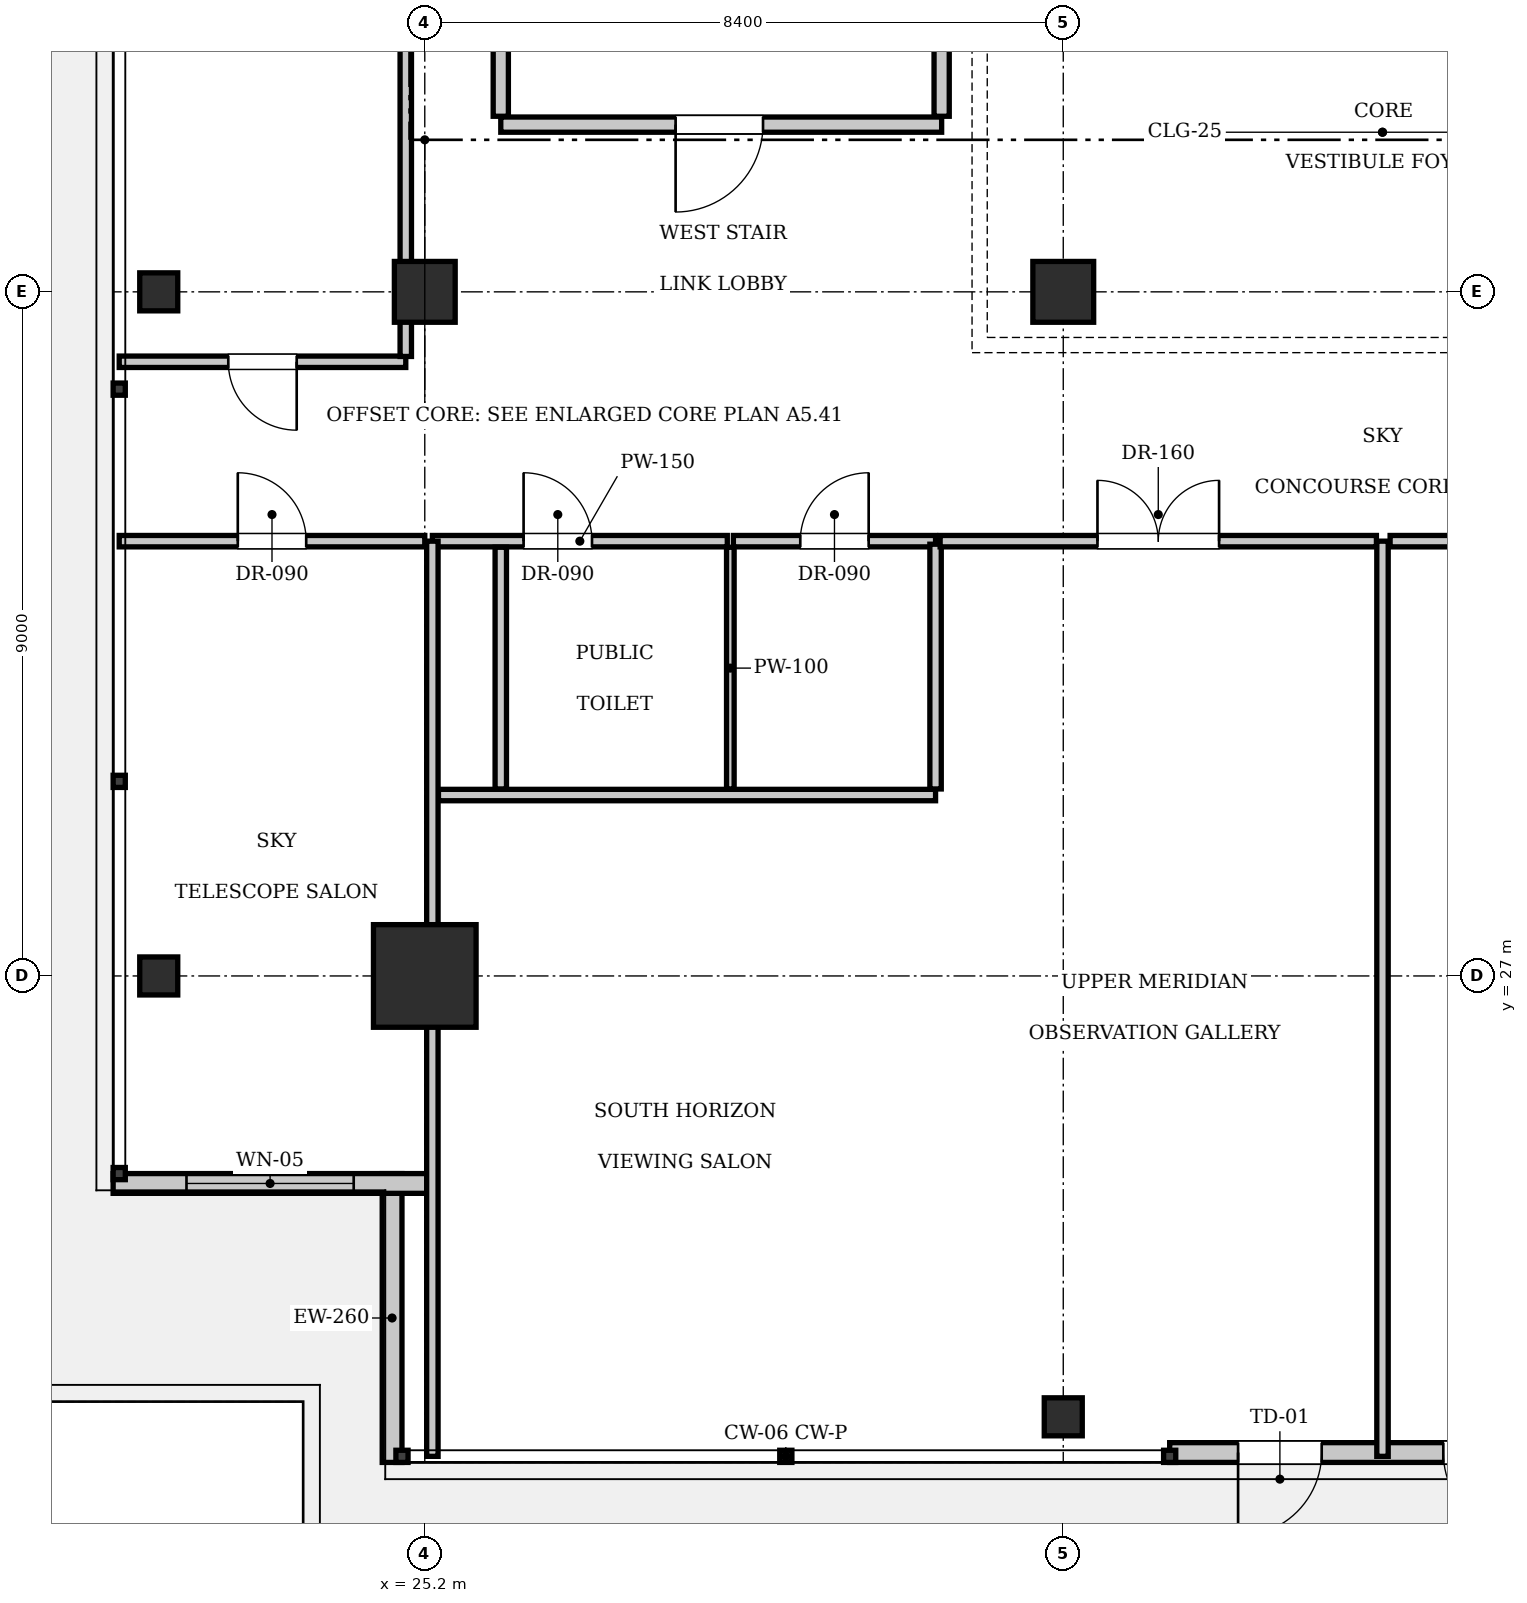
"""IFC4 building model, lengths in metres.
Left out: names, types, materials, properties, quantities, classifications, styles, units other than length and angle.
Written with IfcOpenShell. Run it as: python <this file> out.ifc"""

import sys

from ifc_helpers import new_model, si_unit, direction, frame, frame_2d, origin, origin_2d, place, context, subcontext, project, spatial, rectangle, i_section, extrude, element, fill, save


model = new_model("IFC4")
c1 = context("Model", 3, precision=1e-05, world=origin(), true_north=direction((0.0, 1.0)))
c2 = subcontext(c1, "Body", "Model", "MODEL_VIEW")
j1 = project(units=[si_unit("LENGTHUNIT", "METRE"), si_unit("PLANEANGLEUNIT", "RADIAN")], contexts=[c1])
p1 = place(None, origin())
s1 = spatial("IfcSite", under=j1, at=p1, CompositionType="ELEMENT")
p2 = place(p1, origin())
s2 = spatial("IfcBuilding", under=s1, at=p2, CompositionType="ELEMENT")
p3 = place(p2, frame((0.0, 0.0, 359.1)))
s3 = spatial("IfcBuildingStorey", under=s2, at=p3, CompositionType="ELEMENT", Elevation=359.1)
p4 = place(p3, frame((25.2, 27.0, 0.0), z_axis=(0.0, 0.0, 1.0), x_axis=(1.0, 0.0, 0.0)))
e1 = element("IfcColumn", 1, at=p4, inside=s3, PredefinedType="COLUMN", context=c2, shape_type="SweptSolid", body=[
    extrude(rectangle(XDim=1.35, YDim=1.35, at=origin_2d()), origin(), (0.0, 0.0, 1.0), 5.25),
])
for number, where, z_axis, x_axis in (
    (2, (25.2, 36.0, 0.0), (0.0, 0.0, 1.0), (1.0, 0.0, 0.0)),
    (3, (33.6, 36.0, 0.0), (0.0, 0.0, 1.0), (1.0, 0.0, 0.0)),
):
    element("IfcColumn", number, at=place(p3, frame(where, z_axis=z_axis, x_axis=x_axis)), inside=s3, PredefinedType="COLUMN", context=c2, shape_type="SweptSolid", body=[
        extrude(rectangle(XDim=0.8, YDim=0.8, at=origin_2d()), origin(), (0.0, 0.0, 1.0), 5.25),
    ])
for number, where, z_axis, x_axis in (
    (4, (21.7, 27.0, -0.26), (0.0, 0.0, 1.0), (1.0, 0.0, 0.0)),
    (5, (21.7, 36.0, -0.26), (0.0, 0.0, 1.0), (1.0, 0.0, 0.0)),
    (6, (33.6, 21.2, -0.26), (0.0, 0.0, 1.0), (1.0, 0.0, 0.0)),
):
    element("IfcColumn", number, at=place(p3, frame(where, z_axis=z_axis, x_axis=x_axis)), inside=s3, PredefinedType="COLUMN", context=c2, shape_type="SweptSolid", body=[
        extrude(i_section(OverallWidth=0.5, OverallDepth=0.5, WebThickness=0.022, FlangeThickness=0.032, at=origin_2d()), origin(), (0.0, 0.0, 1.0), 5.51),
    ])
p5 = place(p3, frame((24.77, 20.6, 0.0), z_axis=(0.0, 0.0, 1.0), x_axis=(0.0, 1.0, 0.0)))
e7 = element("IfcWall", 7, at=p5, inside=s3, PredefinedType="SOLIDWALL", context=c2, shape_type="SweptSolid", body=[
    extrude(rectangle(XDim=3.8, YDim=0.26, at=frame_2d((1.9, 0.0))), origin(), (0.0, 0.0, 1.0), 4.97),
])
p6 = place(p3, frame((25.23, 24.27, 0.0), z_axis=(0.0, 0.0, 1.0), x_axis=(-1.0, 0.0, 0.0)))
e8 = element("IfcWall", 8, at=p6, inside=s3, PredefinedType="SOLIDWALL", context=c2, shape_type="SweptSolid", body=[
    extrude(rectangle(XDim=4.13, YDim=0.26, at=frame_2d((2.065, 0.0))), origin(), (0.0, 0.0, 1.0), 4.97),
])
p7 = place(p6, frame((0.965, 0.0, 0.9)))
e9 = element("IfcOpeningElement", 9, at=p7, cuts=e8, PredefinedType="OPENING", context=c2, shape_type="SweptSolid", body=[
    extrude(rectangle(XDim=2.2, YDim=2.8, at=frame_2d((1.1, 1.4))), frame((0.0, 0.14, 0.0), z_axis=(0.0, -1.0, 0.0), x_axis=(1.0, 0.0, 0.0)), (0.0, 0.0, 1.0), 0.28),
])
p8 = place(p3, frame((40.6, 20.73, 0.0), z_axis=(0.0, 0.0, 1.0), x_axis=(-1.0, 0.0, 0.0)))
e10 = element("IfcWall", 10, at=p8, inside=s3, PredefinedType="SOLIDWALL", context=c2, shape_type="SweptSolid", body=[
    extrude(rectangle(XDim=5.6, YDim=0.26, at=frame_2d((2.8, 0.0))), origin(), (0.0, 0.0, 1.0), 4.97),
])
p9 = place(p8, frame((0.9, 0.0, 0.0)))
e11 = element("IfcOpeningElement", 11, at=p9, cuts=e10, PredefinedType="OPENING", context=c2, shape_type="SweptSolid", body=[
    extrude(rectangle(XDim=1.1, YDim=2.2, at=frame_2d((0.55, 1.1))), frame((0.0, 0.14, 0.0), z_axis=(0.0, -1.0, 0.0), x_axis=(1.0, 0.0, 0.0)), (0.0, 0.0, 1.0), 0.28),
])
p10 = place(p8, frame((3.6, 0.0, 0.0)))
e12 = element("IfcOpeningElement", 12, at=p10, cuts=e10, PredefinedType="OPENING", context=c2, shape_type="SweptSolid", body=[
    extrude(rectangle(XDim=1.1, YDim=2.2, at=frame_2d((0.55, 1.1))), frame((0.0, 0.14, 0.0), z_axis=(0.0, -1.0, 0.0), x_axis=(1.0, 0.0, 0.0)), (0.0, 0.0, 1.0), 0.28),
])
p11 = place(p3, frame((26.2, 38.2, 0.0), z_axis=(0.0, 0.0, 1.0), x_axis=(1.0, 0.0, 0.0)))
e13 = element("IfcWall", 13, at=p11, inside=s3, PredefinedType="PARTITIONING", context=c2, shape_type="SweptSolid", body=[
    extrude(rectangle(XDim=5.8, YDim=0.2, at=frame_2d((2.9, 0.0))), origin(), (0.0, 0.0, 1.0), 4.97),
])
p12 = place(p11, frame((2.3, 0.0, 0.0)))
e14 = element("IfcOpeningElement", 14, at=p12, cuts=e13, PredefinedType="OPENING", context=c2, shape_type="SweptSolid", body=[
    extrude(rectangle(XDim=1.15, YDim=2.15, at=frame_2d((0.575, 1.075))), frame((0.0, 0.11, 0.0), z_axis=(0.0, -1.0, 0.0), x_axis=(1.0, 0.0, 0.0)), (0.0, 0.0, 1.0), 0.22),
])
for number, where, z_axis, x_axis in (
    (15, (26.2, 38.31, 0.0), (0.0, 0.0, 1.0), (0.0, 1.0, 0.0)),
    (16, (32.0, 38.31, 0.0), (0.0, 0.0, 1.0), (0.0, 1.0, 0.0)),
):
    element("IfcWall", number, at=place(p3, frame(where, z_axis=z_axis, x_axis=x_axis)), inside=s3, PredefinedType="PARTITIONING", context=c2, shape_type="SweptSolid", body=[
        extrude(rectangle(XDim=3.07, YDim=0.2, at=frame_2d((1.535, 0.0))), origin(), (0.0, 0.0, 1.0), 4.97),
    ])
p13 = place(p3, frame((25.3, 32.72, 0.0), z_axis=(0.0, 0.0, 1.0), x_axis=(1.0, 0.0, 0.0)))
e17 = element("IfcWall", 17, at=p13, inside=s3, PredefinedType="PARTITIONING", context=c2, shape_type="SweptSolid", body=[
    extrude(rectangle(XDim=3.88, YDim=0.15, at=frame_2d((1.94, 0.0))), origin(), (0.0, 0.0, 1.0), 4.97),
])
p14 = place(p13, frame((1.2, 0.0, 0.0)))
e18 = element("IfcOpeningElement", 18, at=p14, cuts=e17, PredefinedType="OPENING", context=c2, shape_type="SweptSolid", body=[
    extrude(rectangle(XDim=0.9, YDim=2.1, at=frame_2d((0.45, 1.05))), frame((0.0, 0.085, 0.0), z_axis=(0.0, -1.0, 0.0), x_axis=(1.0, 0.0, 0.0)), (0.0, 0.0, 1.0), 0.17),
])
p15 = place(p3, frame((29.26, 32.72, 0.0), z_axis=(0.0, 0.0, 1.0), x_axis=(1.0, 0.0, 0.0)))
e19 = element("IfcWall", 19, at=p15, inside=s3, PredefinedType="PARTITIONING", context=c2, shape_type="SweptSolid", body=[
    extrude(rectangle(XDim=2.66, YDim=0.15, at=frame_2d((1.33, 0.0))), origin(), (0.0, 0.0, 1.0), 4.97),
])
p16 = place(p15, frame((0.88, 0.0, 0.0)))
e20 = element("IfcOpeningElement", 20, at=p16, cuts=e19, PredefinedType="OPENING", context=c2, shape_type="SweptSolid", body=[
    extrude(rectangle(XDim=0.9, YDim=2.1, at=frame_2d((0.45, 1.05))), frame((0.0, 0.085, 0.0), z_axis=(0.0, -1.0, 0.0), x_axis=(1.0, 0.0, 0.0)), (0.0, 0.0, 1.0), 0.17),
])
p17 = place(p3, frame((25.38, 29.38, 0.0), z_axis=(0.0, 0.0, 1.0), x_axis=(1.0, 0.0, 0.0)))
e21 = element("IfcWall", 21, at=p17, inside=s3, PredefinedType="PARTITIONING", context=c2, shape_type="SweptSolid", body=[
    extrude(rectangle(XDim=6.54, YDim=0.15, at=frame_2d((3.27, 0.0))), origin(), (0.0, 0.0, 1.0), 4.97),
])
p18 = place(p3, frame((26.2, 29.46, 0.0), z_axis=(0.0, 0.0, 1.0), x_axis=(0.0, 1.0, 0.0)))
e22 = element("IfcWall", 22, at=p18, inside=s3, PredefinedType="PARTITIONING", context=c2, shape_type="SweptSolid", body=[
    extrude(rectangle(XDim=3.18, YDim=0.15, at=frame_2d((1.59, 0.0))), origin(), (0.0, 0.0, 1.0), 4.97),
])
p19 = place(p3, frame((29.22, 29.46, 0.0), z_axis=(0.0, 0.0, 1.0), x_axis=(0.0, 1.0, 0.0)))
e23 = element("IfcWall", 23, at=p19, inside=s3, PredefinedType="PARTITIONING", context=c2, shape_type="SweptSolid", body=[
    extrude(rectangle(XDim=3.18, YDim=0.1, at=frame_2d((1.59, 0.0))), origin(), (0.0, 0.0, 1.0), 4.97),
])
p20 = place(p3, frame((31.92, 29.46, 0.0), z_axis=(0.0, 0.0, 1.0), x_axis=(0.0, 1.0, 0.0)))
e24 = element("IfcWall", 24, at=p20, inside=s3, PredefinedType="PARTITIONING", context=c2, shape_type="SweptSolid", body=[
    extrude(rectangle(XDim=3.22, YDim=0.15, at=frame_2d((1.61, 0.0))), origin(), (0.0, 0.0, 1.0), 4.97),
])
p21 = place(p3, frame((37.8, 20.68, 0.0), z_axis=(0.0, 0.0, 1.0), x_axis=(0.0, 1.0, 0.0)))
e25 = element("IfcWall", 25, at=p21, inside=s3, PredefinedType="PARTITIONING", context=c2, shape_type="SweptSolid", body=[
    extrude(rectangle(XDim=12.04, YDim=0.15, at=frame_2d((6.02, 0.0))), origin(), (0.0, 0.0, 1.0), 4.97),
])
p22 = place(p3, frame((25.3, 20.68, 0.0), z_axis=(0.0, 0.0, 1.0), x_axis=(0.0, 1.0, 0.0)))
e26 = element("IfcWall", 26, at=p22, inside=s3, PredefinedType="PARTITIONING", context=c2, shape_type="SweptSolid", body=[
    extrude(rectangle(XDim=12.04, YDim=0.15, at=frame_2d((6.02, 0.0))), origin(), (0.0, 0.0, 1.0), 4.507),
])
p23 = place(p3, frame((31.98, 32.72, 0.0), z_axis=(0.0, 0.0, 1.0), x_axis=(1.0, 0.0, 0.0)))
e27 = element("IfcWall", 27, at=p23, inside=s3, PredefinedType="PARTITIONING", context=c2, shape_type="SweptSolid", body=[
    extrude(rectangle(XDim=5.74, YDim=0.15, at=frame_2d((2.87, 0.0))), origin(), (0.0, 0.0, 1.0), 4.97),
])
p24 = place(p23, frame((2.07, 0.0, 0.0)))
e28 = element("IfcOpeningElement", 28, at=p24, cuts=e27, PredefinedType="OPENING", context=c2, shape_type="SweptSolid", body=[
    extrude(rectangle(XDim=1.6, YDim=2.3, at=frame_2d((0.8, 1.15))), frame((0.0, 0.085, 0.0), z_axis=(0.0, -1.0, 0.0), x_axis=(1.0, 0.0, 0.0)), (0.0, 0.0, 1.0), 0.17),
])
p25 = place(p3, frame((37.9, 32.72, 0.0), z_axis=(0.0, 0.0, 1.0), x_axis=(1.0, 0.0, 0.0)))
e29 = element("IfcWall", 29, at=p25, inside=s3, PredefinedType="PARTITIONING", context=c2, shape_type="SweptSolid", body=[
    extrude(rectangle(XDim=12.3, YDim=0.15, at=frame_2d((6.15, 0.0))), origin(), (0.0, 0.0, 1.0), 4.97),
])
p26 = place(p25, frame((5.35, 0.0, 0.0)))
e30 = element("IfcOpeningElement", 30, at=p26, cuts=e29, PredefinedType="OPENING", context=c2, shape_type="SweptSolid", body=[
    extrude(rectangle(XDim=1.6, YDim=2.3, at=frame_2d((0.8, 1.15))), frame((0.0, 0.085, 0.0), z_axis=(0.0, -1.0, 0.0), x_axis=(1.0, 0.0, 0.0)), (0.0, 0.0, 1.0), 0.17),
])
p27 = place(p3, frame((21.18, 32.72, 0.0), z_axis=(0.0, 0.0, 1.0), x_axis=(1.0, 0.0, 0.0)))
e31 = element("IfcWall", 31, at=p27, inside=s3, PredefinedType="PARTITIONING", context=c2, shape_type="SweptSolid", body=[
    extrude(rectangle(XDim=4.02, YDim=0.15, at=frame_2d((2.01, 0.0))), origin(), (0.0, 0.0, 1.0), 4.97),
])
p28 = place(p27, frame((1.56, 0.0, 0.0)))
e32 = element("IfcOpeningElement", 32, at=p28, cuts=e31, PredefinedType="OPENING", context=c2, shape_type="SweptSolid", body=[
    extrude(rectangle(XDim=0.9, YDim=2.1, at=frame_2d((0.45, 1.05))), frame((0.0, 0.085, 0.0), z_axis=(0.0, -1.0, 0.0), x_axis=(1.0, 0.0, 0.0)), (0.0, 0.0, 1.0), 0.17),
])
p29 = place(p3, frame((21.18, 35.08, 0.0), z_axis=(0.0, 0.0, 1.0), x_axis=(1.0, 0.0, 0.0)))
e33 = element("IfcWall", 33, at=p29, inside=s3, PredefinedType="PARTITIONING", context=c2, shape_type="SweptSolid", body=[
    extrude(rectangle(XDim=3.77, YDim=0.15, at=frame_2d((1.885, 0.0))), origin(), (0.0, 0.0, 1.0), 4.97),
])
p30 = place(p29, frame((1.435, 0.0, 0.0)))
e34 = element("IfcOpeningElement", 34, at=p30, cuts=e33, PredefinedType="OPENING", context=c2, shape_type="SweptSolid", body=[
    extrude(rectangle(XDim=0.9, YDim=2.1, at=frame_2d((0.45, 1.05))), frame((0.0, 0.085, 0.0), z_axis=(0.0, -1.0, 0.0), x_axis=(1.0, 0.0, 0.0)), (0.0, 0.0, 1.0), 0.17),
])
p31 = place(p3, frame((24.95, 35.15, 0.0), z_axis=(0.0, 0.0, 1.0), x_axis=(0.0, 1.0, 0.0)))
e35 = element("IfcWall", 35, at=p31, inside=s3, PredefinedType="PARTITIONING", context=c2, shape_type="SweptSolid", body=[
    extrude(rectangle(XDim=18.65, YDim=0.15, at=frame_2d((9.325, 0.0))), origin(), (0.0, 0.0, 1.0), 4.97),
])
p32 = place(p7, origin())
e36 = element("IfcWindow", 36, at=p32, inside=s3, PartitioningType="SINGLE_PANEL", PredefinedType="WINDOW", context=c2, shape_type="SweptSolid", body=[
    extrude(rectangle(XDim=2.2, YDim=2.8, at=frame_2d((1.1, 1.4))), frame((0.0, 0.03, 0.0), z_axis=(0.0, -1.0, 0.0), x_axis=(1.0, 0.0, 0.0)), (0.0, 0.0, 1.0), 0.06),
])
fill(e9, e36)
p33 = place(p9, origin())
e37 = element("IfcDoor", 37, at=p33, inside=s3, OperationType="SINGLE_SWING_LEFT", PredefinedType="DOOR", context=c2, shape_type="SweptSolid", body=[
    extrude(rectangle(XDim=1.1, YDim=2.2, at=frame_2d((0.55, 1.1))), frame((0.0, 0.025, 0.0), z_axis=(0.0, -1.0, 0.0), x_axis=(1.0, 0.0, 0.0)), (0.0, 0.0, 1.0), 0.05),
])
fill(e11, e37)
p34 = place(p10, origin())
e38 = element("IfcDoor", 38, at=p34, inside=s3, OperationType="SINGLE_SWING_RIGHT", PredefinedType="DOOR", context=c2, shape_type="SweptSolid", body=[
    extrude(rectangle(XDim=1.1, YDim=2.2, at=frame_2d((0.55, 1.1))), frame((0.0, 0.025, 0.0), z_axis=(0.0, -1.0, 0.0), x_axis=(1.0, 0.0, 0.0)), (0.0, 0.0, 1.0), 0.05),
])
fill(e12, e38)
p35 = place(p12, frame((1.15, 0.0, 0.0), z_axis=(0.0, 0.0, 1.0), x_axis=(-1.0, 0.0, 0.0)))
e39 = element("IfcDoor", 39, at=p35, inside=s3, OperationType="SINGLE_SWING_RIGHT", PredefinedType="DOOR", context=c2, shape_type="SweptSolid", body=[
    extrude(rectangle(XDim=1.15, YDim=2.15, at=frame_2d((0.575, 1.075))), frame((0.0, 0.025, 0.0), z_axis=(0.0, -1.0, 0.0), x_axis=(1.0, 0.0, 0.0)), (0.0, 0.0, 1.0), 0.05),
])
fill(e14, e39)
p36 = place(p14, origin())
e40 = element("IfcDoor", 40, at=p36, inside=s3, OperationType="SINGLE_SWING_LEFT", PredefinedType="DOOR", context=c2, shape_type="SweptSolid", body=[
    extrude(rectangle(XDim=0.9, YDim=2.1, at=frame_2d((0.45, 1.05))), frame((0.0, 0.025, 0.0), z_axis=(0.0, -1.0, 0.0), x_axis=(1.0, 0.0, 0.0)), (0.0, 0.0, 1.0), 0.05),
])
fill(e18, e40)
p37 = place(p16, origin())
e41 = element("IfcDoor", 41, at=p37, inside=s3, OperationType="SINGLE_SWING_RIGHT", PredefinedType="DOOR", context=c2, shape_type="SweptSolid", body=[
    extrude(rectangle(XDim=0.9, YDim=2.1, at=frame_2d((0.45, 1.05))), frame((0.0, 0.025, 0.0), z_axis=(0.0, -1.0, 0.0), x_axis=(1.0, 0.0, 0.0)), (0.0, 0.0, 1.0), 0.05),
])
fill(e20, e41)
p38 = place(p24, origin())
e42 = element("IfcDoor", 42, at=p38, inside=s3, OperationType="DOUBLE_DOOR_SINGLE_SWING", PredefinedType="DOOR", context=c2, shape_type="SweptSolid", body=[
    extrude(rectangle(XDim=1.6, YDim=2.3, at=frame_2d((0.8, 1.15))), frame((0.0, 0.025, 0.0), z_axis=(0.0, -1.0, 0.0), x_axis=(1.0, 0.0, 0.0)), (0.0, 0.0, 1.0), 0.05),
])
fill(e28, e42)
p39 = place(p28, origin())
e43 = element("IfcDoor", 43, at=p39, inside=s3, OperationType="SINGLE_SWING_LEFT", PredefinedType="DOOR", context=c2, shape_type="SweptSolid", body=[
    extrude(rectangle(XDim=0.9, YDim=2.1, at=frame_2d((0.45, 1.05))), frame((0.0, 0.025, 0.0), z_axis=(0.0, -1.0, 0.0), x_axis=(1.0, 0.0, 0.0)), (0.0, 0.0, 1.0), 0.05),
])
fill(e32, e43)
p40 = place(p30, frame((0.9, 0.0, 0.0), z_axis=(0.0, 0.0, 1.0), x_axis=(-1.0, 0.0, 0.0)))
e44 = element("IfcDoor", 44, at=p40, inside=s3, OperationType="SINGLE_SWING_LEFT", PredefinedType="DOOR", context=c2, shape_type="SweptSolid", body=[
    extrude(rectangle(XDim=0.9, YDim=2.1, at=frame_2d((0.45, 1.05))), frame((0.0, 0.025, 0.0), z_axis=(0.0, -1.0, 0.0), x_axis=(1.0, 0.0, 0.0)), (0.0, 0.0, 1.0), 0.05),
])
fill(e34, e44)
save(model, sys.argv[1])
